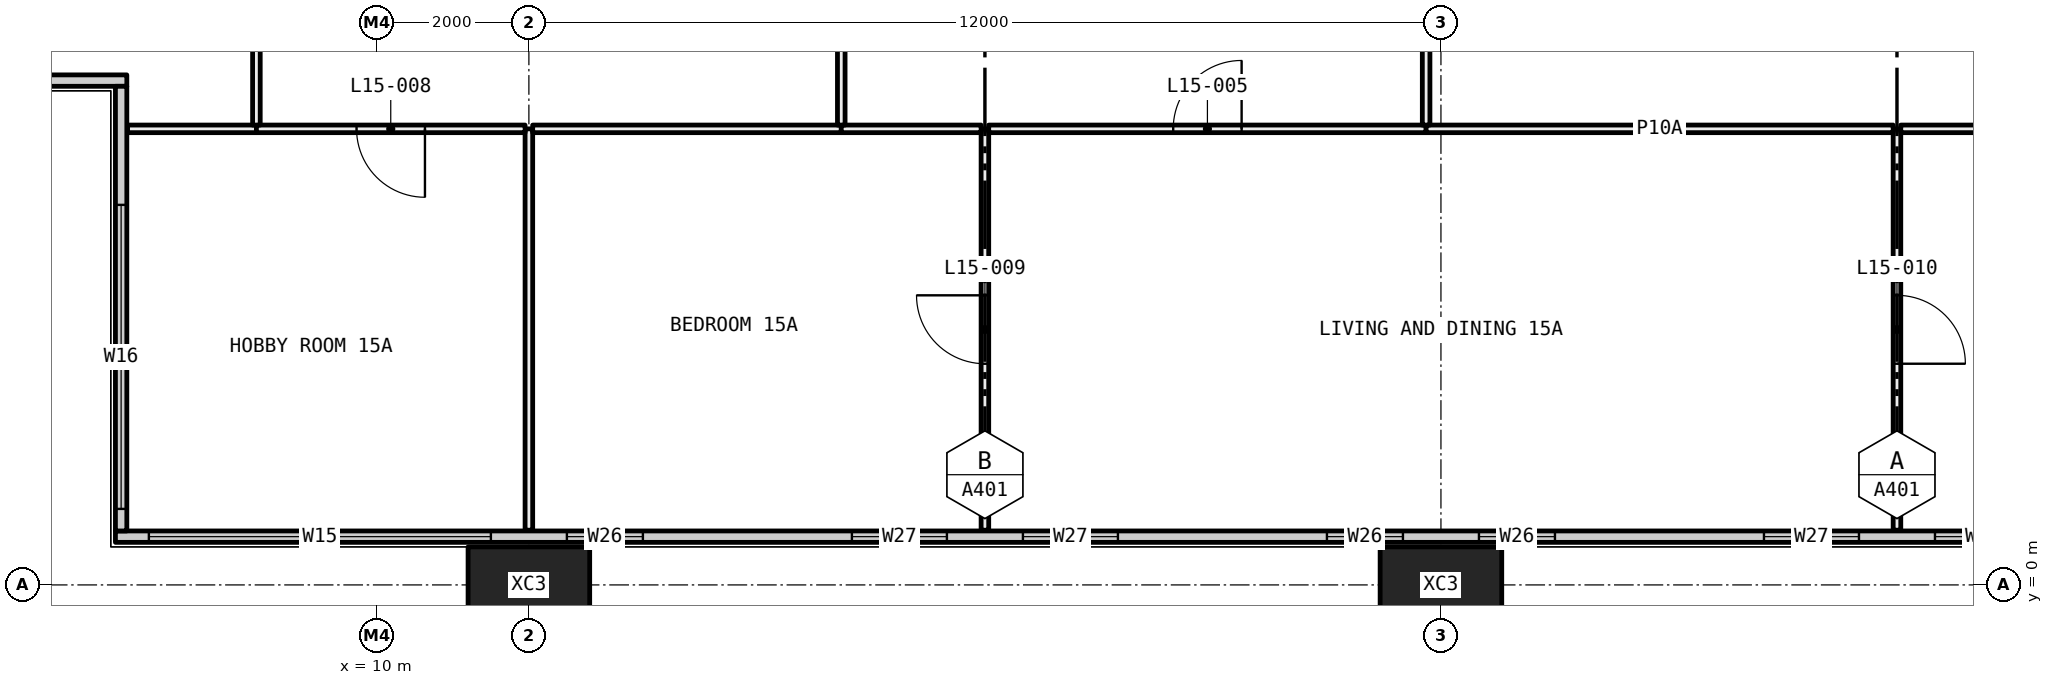
"""IFC4 building model, lengths in metres.
Left out: names, types, materials, properties, quantities, classifications, styles, units other than length and angle.
Written with IfcOpenShell. Run it as: python <this file> out.ifc"""

import sys

from ifc_helpers import new_model, si_unit, direction, frame, frame_2d, origin, origin_2d, place, context, subcontext, project, spatial, rectangle, hollow_rectangle, extrude, element, fill, save


model = new_model("IFC4")
c1 = context("Model", 3, precision=1e-05, world=origin(), true_north=direction((0.0, 1.0)))
c2 = subcontext(c1, "Body", "Model", "MODEL_VIEW")
j1 = project(units=[si_unit("LENGTHUNIT", "METRE"), si_unit("PLANEANGLEUNIT", "RADIAN")], contexts=[c1])
p1 = place(None, origin())
s1 = spatial("IfcSite", under=j1, at=p1, CompositionType="ELEMENT")
p2 = place(p1, origin())
s2 = spatial("IfcBuilding", under=s1, at=p2, CompositionType="ELEMENT")
p3 = place(p2, frame((0.0, 0.0, 64.5)))
s3 = spatial("IfcBuildingStorey", under=s2, at=p3, CompositionType="ELEMENT", Elevation=64.5)
for number, where, z_axis, x_axis in (
    (1, (12.0, 0.0, -0.4), (0.0, 0.0, 1.0), (1.0, 0.0, 0.0)),
    (2, (24.0, 0.0, -0.4), (0.0, 0.0, 1.0), (1.0, 0.0, 0.0)),
):
    element("IfcColumn", number, at=place(p3, frame(where, z_axis=z_axis, x_axis=x_axis)), inside=s3, PredefinedType="COLUMN", context=c2, shape_type="SweptSolid", body=[
        extrude(hollow_rectangle(XDim=1.6, YDim=1.0, WallThickness=0.065, at=origin_2d()), origin(), (0.0, 0.0, 1.0), 3.45),
    ])
p4 = place(p3, frame((6.56, 0.635, 0.0), z_axis=(0.0, 0.0, 1.0), x_axis=(1.0, 0.0, 0.0)))
e3 = element("IfcWall", 3, at=p4, inside=s3, PredefinedType="ELEMENTEDWALL", context=c2, shape_type="SweptSolid", body=[
    extrude(rectangle(XDim=58.88, YDim=0.15, at=frame_2d((29.44, 0.0))), origin(), (0.0, 0.0, 1.0), 3.05),
])
p5 = place(p4, frame((0.44, 0.0, 0.45)))
e4 = element("IfcOpeningElement", 4, at=p5, cuts=e3, PredefinedType="OPENING", context=c2, shape_type="SweptSolid", body=[
    extrude(rectangle(XDim=4.5, YDim=2.55, at=frame_2d((2.25, 1.275))), frame((0.0, 0.085, 0.0), z_axis=(0.0, -1.0, 0.0), x_axis=(1.0, 0.0, 0.0)), (0.0, 0.0, 1.0), 0.17),
])
p6 = place(p4, frame((5.94, 0.0, 0.45)))
e5 = element("IfcOpeningElement", 5, at=p6, cuts=e3, PredefinedType="OPENING", context=c2, shape_type="SweptSolid", body=[
    extrude(rectangle(XDim=1.0, YDim=2.55, at=frame_2d((0.5, 1.275))), frame((0.0, 0.085, 0.0), z_axis=(0.0, -1.0, 0.0), x_axis=(1.0, 0.0, 0.0)), (0.0, 0.0, 1.0), 0.17),
])
p7 = place(p4, frame((9.69, 0.0, 0.45)))
e6 = element("IfcOpeningElement", 6, at=p7, cuts=e3, PredefinedType="OPENING", context=c2, shape_type="SweptSolid", body=[
    extrude(rectangle(XDim=1.25, YDim=2.55, at=frame_2d((0.625, 1.275))), frame((0.0, 0.085, 0.0), z_axis=(0.0, -1.0, 0.0), x_axis=(1.0, 0.0, 0.0)), (0.0, 0.0, 1.0), 0.17),
])
p8 = place(p4, frame((11.94, 0.0, 0.45)))
e7 = element("IfcOpeningElement", 7, at=p8, cuts=e3, PredefinedType="OPENING", context=c2, shape_type="SweptSolid", body=[
    extrude(rectangle(XDim=1.25, YDim=2.55, at=frame_2d((0.625, 1.275))), frame((0.0, 0.085, 0.0), z_axis=(0.0, -1.0, 0.0), x_axis=(1.0, 0.0, 0.0)), (0.0, 0.0, 1.0), 0.17),
])
p9 = place(p4, frame((15.94, 0.0, 0.45)))
e8 = element("IfcOpeningElement", 8, at=p9, cuts=e3, PredefinedType="OPENING", context=c2, shape_type="SweptSolid", body=[
    extrude(rectangle(XDim=1.0, YDim=2.55, at=frame_2d((0.5, 1.275))), frame((0.0, 0.085, 0.0), z_axis=(0.0, -1.0, 0.0), x_axis=(1.0, 0.0, 0.0)), (0.0, 0.0, 1.0), 0.17),
])
p10 = place(p4, frame((17.94, 0.0, 0.45)))
e9 = element("IfcOpeningElement", 9, at=p10, cuts=e3, PredefinedType="OPENING", context=c2, shape_type="SweptSolid", body=[
    extrude(rectangle(XDim=1.0, YDim=2.55, at=frame_2d((0.5, 1.275))), frame((0.0, 0.085, 0.0), z_axis=(0.0, -1.0, 0.0), x_axis=(1.0, 0.0, 0.0)), (0.0, 0.0, 1.0), 0.17),
])
p11 = place(p4, frame((21.69, 0.0, 0.45)))
e10 = element("IfcOpeningElement", 10, at=p11, cuts=e3, PredefinedType="OPENING", context=c2, shape_type="SweptSolid", body=[
    extrude(rectangle(XDim=1.25, YDim=2.55, at=frame_2d((0.625, 1.275))), frame((0.0, 0.085, 0.0), z_axis=(0.0, -1.0, 0.0), x_axis=(1.0, 0.0, 0.0)), (0.0, 0.0, 1.0), 0.17),
])
p12 = place(p4, frame((23.94, 0.0, 0.45)))
e11 = element("IfcOpeningElement", 11, at=p12, cuts=e3, PredefinedType="OPENING", context=c2, shape_type="SweptSolid", body=[
    extrude(rectangle(XDim=1.25, YDim=2.55, at=frame_2d((0.625, 1.275))), frame((0.0, 0.085, 0.0), z_axis=(0.0, -1.0, 0.0), x_axis=(1.0, 0.0, 0.0)), (0.0, 0.0, 1.0), 0.17),
])
p13 = place(p4, frame((27.94, 0.0, 0.45)))
e12 = element("IfcOpeningElement", 12, at=p13, cuts=e3, PredefinedType="OPENING", context=c2, shape_type="SweptSolid", body=[
    extrude(rectangle(XDim=1.0, YDim=2.55, at=frame_2d((0.5, 1.275))), frame((0.0, 0.085, 0.0), z_axis=(0.0, -1.0, 0.0), x_axis=(1.0, 0.0, 0.0)), (0.0, 0.0, 1.0), 0.17),
])
p14 = place(p4, frame((29.94, 0.0, 0.45)))
e13 = element("IfcOpeningElement", 13, at=p14, cuts=e3, PredefinedType="OPENING", context=c2, shape_type="SweptSolid", body=[
    extrude(rectangle(XDim=1.0, YDim=2.55, at=frame_2d((0.5, 1.275))), frame((0.0, 0.085, 0.0), z_axis=(0.0, -1.0, 0.0), x_axis=(1.0, 0.0, 0.0)), (0.0, 0.0, 1.0), 0.17),
])
p15 = place(p4, frame((33.69, 0.0, 0.45)))
e14 = element("IfcOpeningElement", 14, at=p15, cuts=e3, PredefinedType="OPENING", context=c2, shape_type="SweptSolid", body=[
    extrude(rectangle(XDim=1.25, YDim=2.55, at=frame_2d((0.625, 1.275))), frame((0.0, 0.085, 0.0), z_axis=(0.0, -1.0, 0.0), x_axis=(1.0, 0.0, 0.0)), (0.0, 0.0, 1.0), 0.17),
])
p16 = place(p4, frame((35.94, 0.0, 0.45)))
e15 = element("IfcOpeningElement", 15, at=p16, cuts=e3, PredefinedType="OPENING", context=c2, shape_type="SweptSolid", body=[
    extrude(rectangle(XDim=1.25, YDim=2.55, at=frame_2d((0.625, 1.275))), frame((0.0, 0.085, 0.0), z_axis=(0.0, -1.0, 0.0), x_axis=(1.0, 0.0, 0.0)), (0.0, 0.0, 1.0), 0.17),
])
p17 = place(p4, frame((39.94, 0.0, 0.45)))
e16 = element("IfcOpeningElement", 16, at=p17, cuts=e3, PredefinedType="OPENING", context=c2, shape_type="SweptSolid", body=[
    extrude(rectangle(XDim=1.0, YDim=2.55, at=frame_2d((0.5, 1.275))), frame((0.0, 0.085, 0.0), z_axis=(0.0, -1.0, 0.0), x_axis=(1.0, 0.0, 0.0)), (0.0, 0.0, 1.0), 0.17),
])
p18 = place(p4, frame((41.94, 0.0, 0.45)))
e17 = element("IfcOpeningElement", 17, at=p18, cuts=e3, PredefinedType="OPENING", context=c2, shape_type="SweptSolid", body=[
    extrude(rectangle(XDim=1.0, YDim=2.55, at=frame_2d((0.5, 1.275))), frame((0.0, 0.085, 0.0), z_axis=(0.0, -1.0, 0.0), x_axis=(1.0, 0.0, 0.0)), (0.0, 0.0, 1.0), 0.17),
])
p19 = place(p4, frame((45.69, 0.0, 0.45)))
e18 = element("IfcOpeningElement", 18, at=p19, cuts=e3, PredefinedType="OPENING", context=c2, shape_type="SweptSolid", body=[
    extrude(rectangle(XDim=1.25, YDim=2.55, at=frame_2d((0.625, 1.275))), frame((0.0, 0.085, 0.0), z_axis=(0.0, -1.0, 0.0), x_axis=(1.0, 0.0, 0.0)), (0.0, 0.0, 1.0), 0.17),
])
p20 = place(p4, frame((47.94, 0.0, 0.45)))
e19 = element("IfcOpeningElement", 19, at=p20, cuts=e3, PredefinedType="OPENING", context=c2, shape_type="SweptSolid", body=[
    extrude(rectangle(XDim=1.25, YDim=2.55, at=frame_2d((0.625, 1.275))), frame((0.0, 0.085, 0.0), z_axis=(0.0, -1.0, 0.0), x_axis=(1.0, 0.0, 0.0)), (0.0, 0.0, 1.0), 0.17),
])
p21 = place(p4, frame((51.94, 0.0, 0.45)))
e20 = element("IfcOpeningElement", 20, at=p21, cuts=e3, PredefinedType="OPENING", context=c2, shape_type="SweptSolid", body=[
    extrude(rectangle(XDim=1.0, YDim=2.55, at=frame_2d((0.5, 1.275))), frame((0.0, 0.085, 0.0), z_axis=(0.0, -1.0, 0.0), x_axis=(1.0, 0.0, 0.0)), (0.0, 0.0, 1.0), 0.17),
])
p22 = place(p4, frame((53.94, 0.0, 0.45)))
e21 = element("IfcOpeningElement", 21, at=p22, cuts=e3, PredefinedType="OPENING", context=c2, shape_type="SweptSolid", body=[
    extrude(rectangle(XDim=4.5, YDim=2.55, at=frame_2d((2.25, 1.275))), frame((0.0, 0.085, 0.0), z_axis=(0.0, -1.0, 0.0), x_axis=(1.0, 0.0, 0.0)), (0.0, 0.0, 1.0), 0.17),
])
p23 = place(p3, frame((0.56, 6.635, 0.0), z_axis=(0.0, 0.0, 1.0), x_axis=(1.0, 0.0, 0.0)))
e22 = element("IfcWall", 22, at=p23, inside=s3, PredefinedType="ELEMENTEDWALL", context=c2, shape_type="SweptSolid", body=[
    extrude(rectangle(XDim=6.15, YDim=0.15, at=frame_2d((3.075, 0.0))), origin(), (0.0, 0.0, 1.0), 3.05),
])
p24 = place(p23, frame((0.44, 0.0, 0.45)))
e23 = element("IfcOpeningElement", 23, at=p24, cuts=e22, PredefinedType="OPENING", context=c2, shape_type="SweptSolid", body=[
    extrude(rectangle(XDim=4.0, YDim=2.55, at=frame_2d((2.0, 1.275))), frame((0.0, 0.085, 0.0), z_axis=(0.0, -1.0, 0.0), x_axis=(1.0, 0.0, 0.0)), (0.0, 0.0, 1.0), 0.17),
])
p25 = place(p3, frame((6.635, 0.71, 0.0), z_axis=(0.0, 0.0, 1.0), x_axis=(0.0, 1.0, 0.0)))
e24 = element("IfcWall", 24, at=p25, inside=s3, PredefinedType="ELEMENTEDWALL", context=c2, shape_type="SweptSolid", body=[
    extrude(rectangle(XDim=5.85, YDim=0.15, at=frame_2d((2.925, 0.0))), origin(), (0.0, 0.0, 1.0), 3.05),
])
p26 = place(p25, frame((0.29, 0.0, 0.45)))
e25 = element("IfcOpeningElement", 25, at=p26, cuts=e24, PredefinedType="OPENING", context=c2, shape_type="SweptSolid", body=[
    extrude(rectangle(XDim=4.0, YDim=2.55, at=frame_2d((2.0, 1.275))), frame((0.0, 0.085, 0.0), z_axis=(0.0, -1.0, 0.0), x_axis=(1.0, 0.0, 0.0)), (0.0, 0.0, 1.0), 0.17),
])
p27 = place(p3, frame((12.0, 0.72, 0.0), z_axis=(0.0, 0.0, 1.0), x_axis=(0.0, 1.0, 0.0)))
e26 = element("IfcWall", 26, at=p27, inside=s3, PredefinedType="PARTITIONING", context=c2, shape_type="SweptSolid", body=[
    extrude(rectangle(XDim=5.28, YDim=0.1, at=frame_2d((2.64, 0.0))), origin(), (0.0, 0.0, 1.0), 2.45),
])
p28 = place(p3, frame((8.415, 6.0, 0.0), z_axis=(0.0, 0.0, 1.0), x_axis=(-1.0, 0.0, 0.0)))
e27 = element("IfcWall", 27, at=p28, inside=s3, PredefinedType="PARTITIONING", context=c2, shape_type="SweptSolid", body=[
    extrude(rectangle(XDim=1.695, YDim=0.1, at=frame_2d((0.848, 0.0))), origin(), (0.0, 0.0, 1.0), 3.05),
])
p29 = place(p3, frame((11.95, 6.0, 0.0), z_axis=(0.0, 0.0, 1.0), x_axis=(-1.0, 0.0, 0.0)))
e28 = element("IfcWall", 28, at=p29, inside=s3, PredefinedType="PARTITIONING", context=c2, shape_type="SweptSolid", body=[
    extrude(rectangle(XDim=3.535, YDim=0.1, at=frame_2d((1.768, 0.0))), origin(), (0.0, 0.0, 1.0), 2.45),
])
p30 = place(p29, frame((1.317, 0.0, 0.0)))
e29 = element("IfcOpeningElement", 29, at=p30, cuts=e28, PredefinedType="OPENING", context=c2, shape_type="SweptSolid", body=[
    extrude(rectangle(XDim=0.9, YDim=2.1, at=frame_2d((0.45, 1.05))), frame((0.0, 0.06, 0.0), z_axis=(0.0, -1.0, 0.0), x_axis=(1.0, 0.0, 0.0)), (0.0, 0.0, 1.0), 0.12),
])
p31 = place(p3, frame((18.0, 0.72, 0.0), z_axis=(0.0, 0.0, 1.0), x_axis=(0.0, 1.0, 0.0)))
e30 = element("IfcWall", 30, at=p31, inside=s3, PredefinedType="PARTITIONING", context=c2, shape_type="SweptSolid", body=[
    extrude(rectangle(XDim=5.28, YDim=0.1, at=frame_2d((2.64, 0.0))), origin(), (0.0, 0.0, 1.0), 3.05),
])
p32 = place(p31, frame((2.19, 0.0, 0.0)))
e31 = element("IfcOpeningElement", 31, at=p32, cuts=e30, PredefinedType="OPENING", context=c2, shape_type="SweptSolid", body=[
    extrude(rectangle(XDim=0.9, YDim=2.1, at=frame_2d((0.45, 1.05))), frame((0.0, 0.06, 0.0), z_axis=(0.0, -1.0, 0.0), x_axis=(1.0, 0.0, 0.0)), (0.0, 0.0, 1.0), 0.12),
])
p33 = place(p3, frame((16.11, 6.0, 0.0), z_axis=(0.0, 0.0, 1.0), x_axis=(-1.0, 0.0, 0.0)))
e32 = element("IfcWall", 32, at=p33, inside=s3, PredefinedType="PARTITIONING", context=c2, shape_type="SweptSolid", body=[
    extrude(rectangle(XDim=4.06, YDim=0.1, at=frame_2d((2.03, 0.0))), origin(), (0.0, 0.0, 1.0), 2.45),
])
p34 = place(p3, frame((17.95, 6.0, 0.0), z_axis=(0.0, 0.0, 1.0), x_axis=(-1.0, 0.0, 0.0)))
e33 = element("IfcWall", 33, at=p34, inside=s3, PredefinedType="PARTITIONING", context=c2, shape_type="SweptSolid", body=[
    extrude(rectangle(XDim=1.84, YDim=0.1, at=frame_2d((0.92, 0.0))), origin(), (0.0, 0.0, 1.0), 3.05),
])
p35 = place(p3, frame((30.0, 0.72, 0.0), z_axis=(0.0, 0.0, 1.0), x_axis=(0.0, 1.0, 0.0)))
e34 = element("IfcWall", 34, at=p35, inside=s3, PredefinedType="PARTITIONING", context=c2, shape_type="SweptSolid", body=[
    extrude(rectangle(XDim=5.28, YDim=0.1, at=frame_2d((2.64, 0.0))), origin(), (0.0, 0.0, 1.0), 3.05),
])
p36 = place(p35, frame((2.19, 0.0, 0.0)))
e35 = element("IfcOpeningElement", 35, at=p36, cuts=e34, PredefinedType="OPENING", context=c2, shape_type="SweptSolid", body=[
    extrude(rectangle(XDim=0.9, YDim=2.1, at=frame_2d((0.45, 1.05))), frame((0.0, 0.06, 0.0), z_axis=(0.0, -1.0, 0.0), x_axis=(1.0, 0.0, 0.0)), (0.0, 0.0, 1.0), 0.12),
])
p37 = place(p3, frame((23.805, 6.0, 0.0), z_axis=(0.0, 0.0, 1.0), x_axis=(-1.0, 0.0, 0.0)))
e36 = element("IfcWall", 36, at=p37, inside=s3, PredefinedType="PARTITIONING", context=c2, shape_type="SweptSolid", body=[
    extrude(rectangle(XDim=5.755, YDim=0.1, at=frame_2d((2.877, 0.0))), origin(), (0.0, 0.0, 1.0), 3.05),
])
p38 = place(p37, frame((2.427, 0.0, 0.0)))
e37 = element("IfcOpeningElement", 37, at=p38, cuts=e36, PredefinedType="OPENING", context=c2, shape_type="SweptSolid", body=[
    extrude(rectangle(XDim=0.9, YDim=2.1, at=frame_2d((0.45, 1.05))), frame((0.0, 0.06, 0.0), z_axis=(0.0, -1.0, 0.0), x_axis=(1.0, 0.0, 0.0)), (0.0, 0.0, 1.0), 0.12),
])
p39 = place(p3, frame((29.95, 6.0, 0.0), z_axis=(0.0, 0.0, 1.0), x_axis=(-1.0, 0.0, 0.0)))
e38 = element("IfcWall", 38, at=p39, inside=s3, PredefinedType="PARTITIONING", context=c2, shape_type="SweptSolid", body=[
    extrude(rectangle(XDim=6.145, YDim=0.1, at=frame_2d((3.073, 0.0))), origin(), (0.0, 0.0, 1.0), 2.45),
])
p40 = place(p3, frame((31.425, 6.0, 0.0), z_axis=(0.0, 0.0, 1.0), x_axis=(-1.0, 0.0, 0.0)))
e39 = element("IfcWall", 39, at=p40, inside=s3, PredefinedType="PARTITIONING", context=c2, shape_type="SweptSolid", body=[
    extrude(rectangle(XDim=1.375, YDim=0.1, at=frame_2d((0.688, 0.0))), origin(), (0.0, 0.0, 1.0), 3.05),
])
p41 = place(p3, frame((8.415, 6.05, 0.0), z_axis=(0.0, 0.0, 1.0), x_axis=(0.0, 1.0, 0.0)))
e40 = element("IfcWall", 40, at=p41, inside=s3, PredefinedType="PARTITIONING", context=c2, shape_type="SweptSolid", body=[
    extrude(rectangle(XDim=5.875, YDim=0.1, at=frame_2d((2.938, 0.0))), origin(), (0.0, 0.0, 1.0), 2.45),
])
p42 = place(p41, frame((2.488, 0.0, 0.0)))
e41 = element("IfcOpeningElement", 41, at=p42, cuts=e40, PredefinedType="OPENING", context=c2, shape_type="SweptSolid", body=[
    extrude(rectangle(XDim=0.9, YDim=2.1, at=frame_2d((0.45, 1.05))), frame((0.0, 0.06, 0.0), z_axis=(0.0, -1.0, 0.0), x_axis=(1.0, 0.0, 0.0)), (0.0, 0.0, 1.0), 0.12),
])
p43 = place(p3, frame((16.11, 6.05, 0.0), z_axis=(0.0, 0.0, 1.0), x_axis=(0.0, 1.0, 0.0)))
e42 = element("IfcWall", 42, at=p43, inside=s3, PredefinedType="PARTITIONING", context=c2, shape_type="SweptSolid", body=[
    extrude(rectangle(XDim=5.95, YDim=0.1, at=frame_2d((2.975, 0.0))), origin(), (0.0, 0.0, 1.0), 2.45),
])
p44 = place(p3, frame((23.805, 6.05, 0.0), z_axis=(0.0, 0.0, 1.0), x_axis=(0.0, 1.0, 0.0)))
e43 = element("IfcWall", 43, at=p44, inside=s3, PredefinedType="PARTITIONING", context=c2, shape_type="SweptSolid", body=[
    extrude(rectangle(XDim=5.15, YDim=0.1, at=frame_2d((2.575, 0.0))), origin(), (0.0, 0.0, 1.0), 3.05),
])
p45 = place(p44, frame((2.125, 0.0, 0.0)))
e44 = element("IfcOpeningElement", 44, at=p45, cuts=e43, PredefinedType="OPENING", context=c2, shape_type="SweptSolid", body=[
    extrude(rectangle(XDim=0.9, YDim=2.1, at=frame_2d((0.45, 1.05))), frame((0.0, 0.06, 0.0), z_axis=(0.0, -1.0, 0.0), x_axis=(1.0, 0.0, 0.0)), (0.0, 0.0, 1.0), 0.12),
])
p46 = place(p5, origin())
e45 = element("IfcWindow", 45, at=p46, inside=s3, PartitioningType="SINGLE_PANEL", PredefinedType="WINDOW", context=c2, shape_type="SweptSolid", body=[
    extrude(rectangle(XDim=4.5, YDim=2.55, at=frame_2d((2.25, 1.275))), frame((0.0, 0.03, 0.0), z_axis=(0.0, -1.0, 0.0), x_axis=(1.0, 0.0, 0.0)), (0.0, 0.0, 1.0), 0.06),
])
fill(e4, e45)
p47 = place(p6, origin())
e46 = element("IfcWindow", 46, at=p47, inside=s3, PartitioningType="SINGLE_PANEL", PredefinedType="WINDOW", context=c2, shape_type="SweptSolid", body=[
    extrude(rectangle(XDim=1.0, YDim=2.55, at=frame_2d((0.5, 1.275))), frame((0.0, 0.03, 0.0), z_axis=(0.0, -1.0, 0.0), x_axis=(1.0, 0.0, 0.0)), (0.0, 0.0, 1.0), 0.06),
])
fill(e5, e46)
p48 = place(p7, origin())
e47 = element("IfcWindow", 47, at=p48, inside=s3, PartitioningType="SINGLE_PANEL", PredefinedType="WINDOW", context=c2, shape_type="SweptSolid", body=[
    extrude(rectangle(XDim=1.25, YDim=2.55, at=frame_2d((0.625, 1.275))), frame((0.0, 0.03, 0.0), z_axis=(0.0, -1.0, 0.0), x_axis=(1.0, 0.0, 0.0)), (0.0, 0.0, 1.0), 0.06),
])
fill(e6, e47)
p49 = place(p8, origin())
e48 = element("IfcWindow", 48, at=p49, inside=s3, PartitioningType="SINGLE_PANEL", PredefinedType="WINDOW", context=c2, shape_type="SweptSolid", body=[
    extrude(rectangle(XDim=1.25, YDim=2.55, at=frame_2d((0.625, 1.275))), frame((0.0, 0.03, 0.0), z_axis=(0.0, -1.0, 0.0), x_axis=(1.0, 0.0, 0.0)), (0.0, 0.0, 1.0), 0.06),
])
fill(e7, e48)
p50 = place(p9, origin())
e49 = element("IfcWindow", 49, at=p50, inside=s3, PartitioningType="SINGLE_PANEL", PredefinedType="WINDOW", context=c2, shape_type="SweptSolid", body=[
    extrude(rectangle(XDim=1.0, YDim=2.55, at=frame_2d((0.5, 1.275))), frame((0.0, 0.03, 0.0), z_axis=(0.0, -1.0, 0.0), x_axis=(1.0, 0.0, 0.0)), (0.0, 0.0, 1.0), 0.06),
])
fill(e8, e49)
p51 = place(p10, origin())
e50 = element("IfcWindow", 50, at=p51, inside=s3, PartitioningType="SINGLE_PANEL", PredefinedType="WINDOW", context=c2, shape_type="SweptSolid", body=[
    extrude(rectangle(XDim=1.0, YDim=2.55, at=frame_2d((0.5, 1.275))), frame((0.0, 0.03, 0.0), z_axis=(0.0, -1.0, 0.0), x_axis=(1.0, 0.0, 0.0)), (0.0, 0.0, 1.0), 0.06),
])
fill(e9, e50)
p52 = place(p11, origin())
e51 = element("IfcWindow", 51, at=p52, inside=s3, PartitioningType="SINGLE_PANEL", PredefinedType="WINDOW", context=c2, shape_type="SweptSolid", body=[
    extrude(rectangle(XDim=1.25, YDim=2.55, at=frame_2d((0.625, 1.275))), frame((0.0, 0.03, 0.0), z_axis=(0.0, -1.0, 0.0), x_axis=(1.0, 0.0, 0.0)), (0.0, 0.0, 1.0), 0.06),
])
fill(e10, e51)
p53 = place(p12, origin())
e52 = element("IfcWindow", 52, at=p53, inside=s3, PartitioningType="SINGLE_PANEL", PredefinedType="WINDOW", context=c2, shape_type="SweptSolid", body=[
    extrude(rectangle(XDim=1.25, YDim=2.55, at=frame_2d((0.625, 1.275))), frame((0.0, 0.03, 0.0), z_axis=(0.0, -1.0, 0.0), x_axis=(1.0, 0.0, 0.0)), (0.0, 0.0, 1.0), 0.06),
])
fill(e11, e52)
p54 = place(p26, origin())
e53 = element("IfcWindow", 53, at=p54, inside=s3, PartitioningType="SINGLE_PANEL", PredefinedType="WINDOW", context=c2, shape_type="SweptSolid", body=[
    extrude(rectangle(XDim=4.0, YDim=2.55, at=frame_2d((2.0, 1.275))), frame((0.0, 0.03, 0.0), z_axis=(0.0, -1.0, 0.0), x_axis=(1.0, 0.0, 0.0)), (0.0, 0.0, 1.0), 0.06),
])
fill(e25, e53)
p55 = place(p38, frame((0.9, 0.0, 0.0), x_axis=(-1.0, 0.0, 0.0)))
e54 = element("IfcDoor", 54, at=p55, inside=s3, OperationType="SINGLE_SWING_LEFT", PredefinedType="DOOR", context=c2, shape_type="SweptSolid", body=[
    extrude(rectangle(XDim=0.9, YDim=2.1, at=frame_2d((0.45, 1.05))), frame((0.0, 0.025, 0.0), z_axis=(0.0, -1.0, 0.0), x_axis=(1.0, 0.0, 0.0)), (0.0, 0.0, 1.0), 0.05),
])
fill(e37, e54)
p56 = place(p30, origin())
e55 = element("IfcDoor", 55, at=p56, inside=s3, OperationType="SINGLE_SWING_RIGHT", PredefinedType="DOOR", context=c2, shape_type="SweptSolid", body=[
    extrude(rectangle(XDim=0.9, YDim=2.1, at=frame_2d((0.45, 1.05))), frame((0.0, 0.025, 0.0), z_axis=(0.0, -1.0, 0.0), x_axis=(1.0, 0.0, 0.0)), (0.0, 0.0, 1.0), 0.05),
])
fill(e29, e55)
p57 = place(p32, origin())
e56 = element("IfcDoor", 56, at=p57, inside=s3, OperationType="SINGLE_SWING_LEFT", PredefinedType="DOOR", context=c2, shape_type="SweptSolid", body=[
    extrude(rectangle(XDim=0.9, YDim=2.1, at=frame_2d((0.45, 1.05))), frame((0.0, 0.025, 0.0), z_axis=(0.0, -1.0, 0.0), x_axis=(1.0, 0.0, 0.0)), (0.0, 0.0, 1.0), 0.05),
])
fill(e31, e56)
p58 = place(p36, frame((0.9, 0.0, 0.0), x_axis=(-1.0, 0.0, 0.0)))
e57 = element("IfcDoor", 57, at=p58, inside=s3, OperationType="SINGLE_SWING_LEFT", PredefinedType="DOOR", context=c2, shape_type="SweptSolid", body=[
    extrude(rectangle(XDim=0.9, YDim=2.1, at=frame_2d((0.45, 1.05))), frame((0.0, 0.025, 0.0), z_axis=(0.0, -1.0, 0.0), x_axis=(1.0, 0.0, 0.0)), (0.0, 0.0, 1.0), 0.05),
])
fill(e35, e57)
save(model, sys.argv[1])
